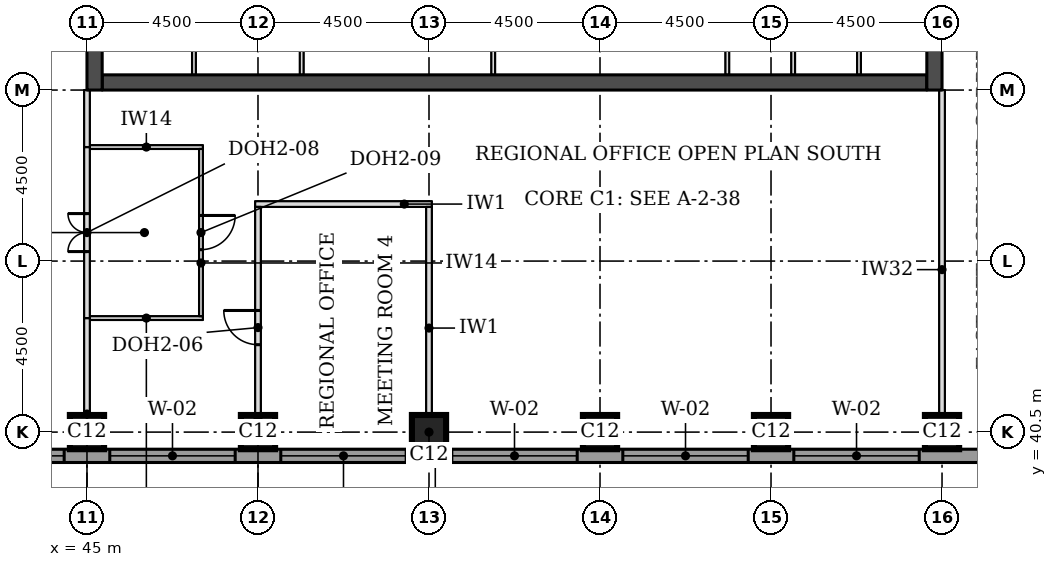
"""IFC4 building model, lengths in metres.
Left out: names, types, materials, properties, quantities, classifications, styles, units other than length and angle.
Written with IfcOpenShell. Run it as: python <this file> out.ifc"""

import sys

from ifc_helpers import new_model, si_unit, direction, frame, frame_2d, origin, origin_2d, place, context, subcontext, project, spatial, rectangle, extrude, element, fill, save


model = new_model("IFC4")
c1 = context("Model", 3, precision=1e-05, world=origin(), true_north=direction((0.0, 1.0)))
c2 = subcontext(c1, "Body", "Model", "MODEL_VIEW")
j1 = project(units=[si_unit("LENGTHUNIT", "METRE"), si_unit("PLANEANGLEUNIT", "RADIAN")], contexts=[c1])
p1 = place(None, origin())
s1 = spatial("IfcSite", under=j1, at=p1, CompositionType="ELEMENT")
p2 = place(p1, origin())
s2 = spatial("IfcBuilding", under=s1, at=p2, CompositionType="ELEMENT")
p3 = place(p2, frame((0.0, 0.0, 155.1)))
s3 = spatial("IfcBuildingStorey", under=s2, at=p3, CompositionType="ELEMENT", Elevation=155.1)
for number, where, z_axis, x_axis in (
    (1, (45.0, 40.5, 0.0), (0.0, 0.0, 1.0), (1.0, 0.0, 0.0)),
    (2, (49.5, 40.5, 0.0), (0.0, 0.0, 1.0), (1.0, 0.0, 0.0)),
    (3, (54.0, 40.5, 0.0), (0.0, 0.0, 1.0), (1.0, 0.0, 0.0)),
    (4, (58.5, 40.5, 0.0), (0.0, 0.0, 1.0), (1.0, 0.0, 0.0)),
    (5, (63.0, 40.5, 0.0), (0.0, 0.0, 1.0), (1.0, 0.0, 0.0)),
    (6, (67.5, 40.5, 0.0), (0.0, 0.0, 1.0), (1.0, 0.0, 0.0)),
):
    element("IfcColumn", number, at=place(p3, frame(where, z_axis=z_axis, x_axis=x_axis)), inside=s3, PredefinedType="COLUMN", context=c2, shape_type="SweptSolid", body=[
        extrude(rectangle(XDim=0.9, YDim=0.9, at=origin_2d()), origin(), (0.0, 0.0, 1.0), 3.7),
    ])
p4 = place(p3, frame((45.4, 49.7, 0.0), z_axis=(0.0, 0.0, 1.0), x_axis=(1.0, 0.0, 0.0)))
e7 = element("IfcWall", 7, at=p4, inside=s3, PredefinedType="SHEAR", context=c2, shape_type="SweptSolid", body=[
    extrude(rectangle(XDim=21.7, YDim=0.4, at=frame_2d((10.85, 0.0))), origin(), (0.0, 0.0, 1.0), 3.7),
])
p5 = place(p3, frame((45.2, 49.5, 0.0), z_axis=(0.0, 0.0, 1.0), x_axis=(0.0, 1.0, 0.0)))
e8 = element("IfcWall", 8, at=p5, inside=s3, PredefinedType="SHEAR", context=c2, shape_type="SweptSolid", body=[
    extrude(rectangle(XDim=22.5, YDim=0.4, at=frame_2d((11.25, 0.0))), origin(), (0.0, 0.0, 1.0), 3.7),
])
p6 = place(p5, frame((4.2, 0.0, 0.0)))
e9 = element("IfcOpeningElement", 9, at=p6, cuts=e8, PredefinedType="OPENING", context=c2, shape_type="SweptSolid", body=[
    extrude(rectangle(XDim=1.8, YDim=2.1, at=frame_2d((0.9, 1.05))), frame((0.0, 0.21, 0.0), z_axis=(0.0, -1.0, 0.0), x_axis=(1.0, 0.0, 0.0)), (0.0, 0.0, 1.0), 0.42),
])
p7 = place(p5, frame((6.9, 0.0, 0.0)))
e10 = element("IfcOpeningElement", 10, at=p7, cuts=e8, PredefinedType="OPENING", context=c2, shape_type="SweptSolid", body=[
    extrude(rectangle(XDim=1.1, YDim=2.1, at=frame_2d((0.55, 1.05))), frame((0.0, 0.21, 0.0), z_axis=(0.0, -1.0, 0.0), x_axis=(1.0, 0.0, 0.0)), (0.0, 0.0, 1.0), 0.42),
])
p8 = place(p5, frame((13.6, 0.0, 0.0)))
e11 = element("IfcOpeningElement", 11, at=p8, cuts=e8, PredefinedType="OPENING", context=c2, shape_type="SweptSolid", body=[
    extrude(rectangle(XDim=1.1, YDim=2.1, at=frame_2d((0.55, 1.05))), frame((0.0, 0.21, 0.0), z_axis=(0.0, -1.0, 0.0), x_axis=(1.0, 0.0, 0.0)), (0.0, 0.0, 1.0), 0.42),
])
p9 = place(p5, frame((16.5, 0.0, 0.0)))
e12 = element("IfcOpeningElement", 12, at=p9, cuts=e8, PredefinedType="OPENING", context=c2, shape_type="SweptSolid", body=[
    extrude(rectangle(XDim=1.8, YDim=2.1, at=frame_2d((0.9, 1.05))), frame((0.0, 0.21, 0.0), z_axis=(0.0, -1.0, 0.0), x_axis=(1.0, 0.0, 0.0)), (0.0, 0.0, 1.0), 0.42),
])
p10 = place(p3, frame((67.3, 49.5, 0.0), z_axis=(0.0, 0.0, 1.0), x_axis=(0.0, 1.0, 0.0)))
e13 = element("IfcWall", 13, at=p10, inside=s3, PredefinedType="SHEAR", context=c2, shape_type="SweptSolid", body=[
    extrude(rectangle(XDim=22.5, YDim=0.4, at=frame_2d((11.25, 0.0))), origin(), (0.0, 0.0, 1.0), 3.7),
])
p11 = place(p10, frame((4.2, 0.0, 0.0)))
e14 = element("IfcOpeningElement", 14, at=p11, cuts=e13, PredefinedType="OPENING", context=c2, shape_type="SweptSolid", body=[
    extrude(rectangle(XDim=1.8, YDim=2.1, at=frame_2d((0.9, 1.05))), frame((0.0, 0.21, 0.0), z_axis=(0.0, -1.0, 0.0), x_axis=(1.0, 0.0, 0.0)), (0.0, 0.0, 1.0), 0.42),
])
p12 = place(p10, frame((6.9, 0.0, 0.0)))
e15 = element("IfcOpeningElement", 15, at=p12, cuts=e13, PredefinedType="OPENING", context=c2, shape_type="SweptSolid", body=[
    extrude(rectangle(XDim=1.1, YDim=2.1, at=frame_2d((0.55, 1.05))), frame((0.0, 0.21, 0.0), z_axis=(0.0, -1.0, 0.0), x_axis=(1.0, 0.0, 0.0)), (0.0, 0.0, 1.0), 0.42),
])
p13 = place(p10, frame((13.6, 0.0, 0.0)))
e16 = element("IfcOpeningElement", 16, at=p13, cuts=e13, PredefinedType="OPENING", context=c2, shape_type="SweptSolid", body=[
    extrude(rectangle(XDim=1.1, YDim=2.1, at=frame_2d((0.55, 1.05))), frame((0.0, 0.21, 0.0), z_axis=(0.0, -1.0, 0.0), x_axis=(1.0, 0.0, 0.0)), (0.0, 0.0, 1.0), 0.42),
])
p14 = place(p10, frame((16.5, 0.0, 0.0)))
e17 = element("IfcOpeningElement", 17, at=p14, cuts=e13, PredefinedType="OPENING", context=c2, shape_type="SweptSolid", body=[
    extrude(rectangle(XDim=1.8, YDim=2.1, at=frame_2d((0.9, 1.05))), frame((0.0, 0.21, 0.0), z_axis=(0.0, -1.0, 0.0), x_axis=(1.0, 0.0, 0.0)), (0.0, 0.0, 1.0), 0.42),
])
p15 = place(p3, frame((36.0, 39.875, 0.0), z_axis=(0.0, 0.0, 1.0), x_axis=(1.0, 0.0, 0.0)))
e18 = element("IfcWall", 18, at=p15, inside=s3, PredefinedType="STANDARD", context=c2, shape_type="SweptSolid", body=[
    extrude(rectangle(XDim=36.331, YDim=0.35, at=frame_2d((18.166, 0.0))), origin(), (0.0, 0.0, 1.0), 3.525),
])
p16 = place(p15, frame((5.1, 0.0, 0.9)))
e19 = element("IfcOpeningElement", 19, at=p16, cuts=e18, PredefinedType="OPENING", context=c2, shape_type="SweptSolid", body=[
    extrude(rectangle(XDim=3.3, YDim=1.9, at=frame_2d((1.65, 0.95))), frame((0.0, 0.185, 0.0), z_axis=(0.0, -1.0, 0.0), x_axis=(1.0, 0.0, 0.0)), (0.0, 0.0, 1.0), 0.37),
])
p17 = place(p15, frame((9.6, 0.0, 0.9)))
e20 = element("IfcOpeningElement", 20, at=p17, cuts=e18, PredefinedType="OPENING", context=c2, shape_type="SweptSolid", body=[
    extrude(rectangle(XDim=3.3, YDim=1.9, at=frame_2d((1.65, 0.95))), frame((0.0, 0.185, 0.0), z_axis=(0.0, -1.0, 0.0), x_axis=(1.0, 0.0, 0.0)), (0.0, 0.0, 1.0), 0.37),
])
p18 = place(p15, frame((14.1, 0.0, 0.9)))
e21 = element("IfcOpeningElement", 21, at=p18, cuts=e18, PredefinedType="OPENING", context=c2, shape_type="SweptSolid", body=[
    extrude(rectangle(XDim=3.3, YDim=1.9, at=frame_2d((1.65, 0.95))), frame((0.0, 0.185, 0.0), z_axis=(0.0, -1.0, 0.0), x_axis=(1.0, 0.0, 0.0)), (0.0, 0.0, 1.0), 0.37),
])
p19 = place(p15, frame((18.6, 0.0, 0.9)))
e22 = element("IfcOpeningElement", 22, at=p19, cuts=e18, PredefinedType="OPENING", context=c2, shape_type="SweptSolid", body=[
    extrude(rectangle(XDim=3.3, YDim=1.9, at=frame_2d((1.65, 0.95))), frame((0.0, 0.185, 0.0), z_axis=(0.0, -1.0, 0.0), x_axis=(1.0, 0.0, 0.0)), (0.0, 0.0, 1.0), 0.37),
])
p20 = place(p15, frame((23.1, 0.0, 0.9)))
e23 = element("IfcOpeningElement", 23, at=p20, cuts=e18, PredefinedType="OPENING", context=c2, shape_type="SweptSolid", body=[
    extrude(rectangle(XDim=3.3, YDim=1.9, at=frame_2d((1.65, 0.95))), frame((0.0, 0.185, 0.0), z_axis=(0.0, -1.0, 0.0), x_axis=(1.0, 0.0, 0.0)), (0.0, 0.0, 1.0), 0.37),
])
p21 = place(p15, frame((27.6, 0.0, 0.9)))
e24 = element("IfcOpeningElement", 24, at=p21, cuts=e18, PredefinedType="OPENING", context=c2, shape_type="SweptSolid", body=[
    extrude(rectangle(XDim=3.3, YDim=1.9, at=frame_2d((1.65, 0.95))), frame((0.0, 0.185, 0.0), z_axis=(0.0, -1.0, 0.0), x_axis=(1.0, 0.0, 0.0)), (0.0, 0.0, 1.0), 0.37),
])
p22 = place(p3, frame((45.075, 43.5, 0.0), z_axis=(0.0, 0.0, 1.0), x_axis=(1.0, 0.0, 0.0)))
e25 = element("IfcWall", 25, at=p22, inside=s3, PredefinedType="PARTITIONING", context=c2, shape_type="SweptSolid", body=[
    extrude(rectangle(XDim=2.975, YDim=0.1, at=frame_2d((1.488, 0.0))), origin(), (0.0, 0.0, 1.0), 3.55),
])
p23 = place(p3, frame((49.425, 46.5, 0.0), z_axis=(0.0, 0.0, 1.0), x_axis=(1.0, 0.0, 0.0)))
e26 = element("IfcWall", 26, at=p23, inside=s3, PredefinedType="PARTITIONING", context=c2, shape_type="SweptSolid", body=[
    extrude(rectangle(XDim=4.65, YDim=0.15, at=frame_2d((2.325, 0.0))), origin(), (0.0, 0.0, 1.0), 3.55),
])
p24 = place(p3, frame((45.075, 48.0, 0.0), z_axis=(0.0, 0.0, 1.0), x_axis=(1.0, 0.0, 0.0)))
e27 = element("IfcWall", 27, at=p24, inside=s3, PredefinedType="PARTITIONING", context=c2, shape_type="SweptSolid", body=[
    extrude(rectangle(XDim=2.975, YDim=0.1, at=frame_2d((1.488, 0.0))), origin(), (0.0, 0.0, 1.0), 3.55),
])
p25 = place(p3, frame((45.0, 40.05, 0.0), z_axis=(0.0, 0.0, 1.0), x_axis=(0.0, 1.0, 0.0)))
e28 = element("IfcWall", 28, at=p25, inside=s3, PredefinedType="PARTITIONING", context=c2, shape_type="SweptSolid", body=[
    extrude(rectangle(XDim=3.45, YDim=0.15, at=frame_2d((1.725, 0.0))), origin(), (0.0, 0.0, 1.0), 3.022),
])
p26 = place(p3, frame((49.5, 40.05, 0.0), z_axis=(0.0, 0.0, 1.0), x_axis=(0.0, 1.0, 0.0)))
e29 = element("IfcWall", 29, at=p26, inside=s3, PredefinedType="PARTITIONING", context=c2, shape_type="SweptSolid", body=[
    extrude(rectangle(XDim=6.375, YDim=0.15, at=frame_2d((3.188, 0.0))), origin(), (0.0, 0.0, 1.0), 3.55),
])
p27 = place(p26, frame((2.75, 0.0, 0.0)))
e30 = element("IfcOpeningElement", 30, at=p27, cuts=e29, PredefinedType="OPENING", context=c2, shape_type="SweptSolid", body=[
    extrude(rectangle(XDim=0.9, YDim=2.1, at=frame_2d((0.45, 1.05))), frame((0.0, 0.085, 0.0), z_axis=(0.0, -1.0, 0.0), x_axis=(1.0, 0.0, 0.0)), (0.0, 0.0, 1.0), 0.17),
])
p28 = place(p3, frame((54.0, 40.05, 0.0), z_axis=(0.0, 0.0, 1.0), x_axis=(0.0, 1.0, 0.0)))
e31 = element("IfcWall", 31, at=p28, inside=s3, PredefinedType="PARTITIONING", context=c2, shape_type="SweptSolid", body=[
    extrude(rectangle(XDim=6.375, YDim=0.15, at=frame_2d((3.188, 0.0))), origin(), (0.0, 0.0, 1.0), 3.55),
])
p29 = place(p3, frame((67.5, 40.05, 0.0), z_axis=(0.0, 0.0, 1.0), x_axis=(0.0, 1.0, 0.0)))
e32 = element("IfcWall", 32, at=p29, inside=s3, PredefinedType="PARTITIONING", context=c2, shape_type="SweptSolid", body=[
    extrude(rectangle(XDim=9.45, YDim=0.15, at=frame_2d((4.725, 0.0))), origin(), (0.0, 0.0, 1.0), 3.022),
])
p30 = place(p3, frame((45.0, 43.5, 0.0), z_axis=(0.0, 0.0, 1.0), x_axis=(0.0, 1.0, 0.0)))
e33 = element("IfcWall", 33, at=p30, inside=s3, PredefinedType="PARTITIONING", context=c2, shape_type="SweptSolid", body=[
    extrude(rectangle(XDim=4.5, YDim=0.15, at=frame_2d((2.25, 0.0))), origin(), (0.0, 0.0, 1.0), 3.022),
])
p31 = place(p30, frame((1.75, 0.0, 0.0)))
e34 = element("IfcOpeningElement", 34, at=p31, cuts=e33, PredefinedType="OPENING", context=c2, shape_type="SweptSolid", body=[
    extrude(rectangle(XDim=1.0, YDim=2.1, at=frame_2d((0.5, 1.05))), frame((0.0, 0.085, 0.0), z_axis=(0.0, -1.0, 0.0), x_axis=(1.0, 0.0, 0.0)), (0.0, 0.0, 1.0), 0.17),
])
p32 = place(p3, frame((48.0, 43.55, 0.0), z_axis=(0.0, 0.0, 1.0), x_axis=(0.0, 1.0, 0.0)))
e35 = element("IfcWall", 35, at=p32, inside=s3, PredefinedType="PARTITIONING", context=c2, shape_type="SweptSolid", body=[
    extrude(rectangle(XDim=4.4, YDim=0.1, at=frame_2d((2.2, 0.0))), origin(), (0.0, 0.0, 1.0), 3.55),
])
p33 = place(p32, frame((1.75, 0.0, 0.0)))
e36 = element("IfcOpeningElement", 36, at=p33, cuts=e35, PredefinedType="OPENING", context=c2, shape_type="SweptSolid", body=[
    extrude(rectangle(XDim=0.9, YDim=2.1, at=frame_2d((0.45, 1.05))), frame((0.0, 0.06, 0.0), z_axis=(0.0, -1.0, 0.0), x_axis=(1.0, 0.0, 0.0)), (0.0, 0.0, 1.0), 0.12),
])
p34 = place(p3, frame((45.0, 48.0, 0.0), z_axis=(0.0, 0.0, 1.0), x_axis=(0.0, 1.0, 0.0)))
e37 = element("IfcWall", 37, at=p34, inside=s3, PredefinedType="PARTITIONING", context=c2, shape_type="SweptSolid", body=[
    extrude(rectangle(XDim=1.5, YDim=0.15, at=frame_2d((0.75, 0.0))), origin(), (0.0, 0.0, 1.0), 3.022),
])
for number, where, z_axis, x_axis in (
    (38, (47.815, 49.9, 0.0), (0.0, 0.0, 1.0), (0.0, 1.0, 0.0)),
    (39, (50.65, 49.9, 0.0), (0.0, 0.0, 1.0), (0.0, 1.0, 0.0)),
    (40, (55.69, 49.9, 0.0), (0.0, 0.0, 1.0), (0.0, 1.0, 0.0)),
    (41, (61.85, 49.9, 0.0), (0.0, 0.0, 1.0), (0.0, 1.0, 0.0)),
    (42, (63.583, 49.9, 0.0), (0.0, 0.0, 1.0), (0.0, 1.0, 0.0)),
    (43, (65.315, 49.9, 0.0), (0.0, 0.0, 1.0), (0.0, 1.0, 0.0)),
):
    element("IfcWall", number, at=place(p3, frame(where, z_axis=z_axis, x_axis=x_axis)), inside=s3, PredefinedType="PARTITIONING", context=c2, shape_type="SweptSolid", body=[
        extrude(rectangle(XDim=3.1, YDim=0.1, at=frame_2d((1.55, 0.0))), origin(), (0.0, 0.0, 1.0), 3.55),
    ])
p35 = place(p16, origin())
e44 = element("IfcWindow", 44, at=p35, inside=s3, PartitioningType="SINGLE_PANEL", PredefinedType="WINDOW", context=c2, shape_type="SweptSolid", body=[
    extrude(rectangle(XDim=3.3, YDim=1.9, at=frame_2d((1.65, 0.95))), frame((0.0, 0.085, 0.0), z_axis=(0.0, -1.0, 0.0), x_axis=(1.0, 0.0, 0.0)), (0.0, 0.0, 1.0), 0.06),
])
fill(e19, e44)
p36 = place(p17, origin())
e45 = element("IfcWindow", 45, at=p36, inside=s3, PartitioningType="SINGLE_PANEL", PredefinedType="WINDOW", context=c2, shape_type="SweptSolid", body=[
    extrude(rectangle(XDim=3.3, YDim=1.9, at=frame_2d((1.65, 0.95))), frame((0.0, 0.085, 0.0), z_axis=(0.0, -1.0, 0.0), x_axis=(1.0, 0.0, 0.0)), (0.0, 0.0, 1.0), 0.06),
])
fill(e20, e45)
p37 = place(p18, origin())
e46 = element("IfcWindow", 46, at=p37, inside=s3, PartitioningType="SINGLE_PANEL", PredefinedType="WINDOW", context=c2, shape_type="SweptSolid", body=[
    extrude(rectangle(XDim=3.3, YDim=1.9, at=frame_2d((1.65, 0.95))), frame((0.0, 0.085, 0.0), z_axis=(0.0, -1.0, 0.0), x_axis=(1.0, 0.0, 0.0)), (0.0, 0.0, 1.0), 0.06),
])
fill(e21, e46)
p38 = place(p19, origin())
e47 = element("IfcWindow", 47, at=p38, inside=s3, PartitioningType="SINGLE_PANEL", PredefinedType="WINDOW", context=c2, shape_type="SweptSolid", body=[
    extrude(rectangle(XDim=3.3, YDim=1.9, at=frame_2d((1.65, 0.95))), frame((0.0, 0.085, 0.0), z_axis=(0.0, -1.0, 0.0), x_axis=(1.0, 0.0, 0.0)), (0.0, 0.0, 1.0), 0.06),
])
fill(e22, e47)
p39 = place(p20, origin())
e48 = element("IfcWindow", 48, at=p39, inside=s3, PartitioningType="SINGLE_PANEL", PredefinedType="WINDOW", context=c2, shape_type="SweptSolid", body=[
    extrude(rectangle(XDim=3.3, YDim=1.9, at=frame_2d((1.65, 0.95))), frame((0.0, 0.085, 0.0), z_axis=(0.0, -1.0, 0.0), x_axis=(1.0, 0.0, 0.0)), (0.0, 0.0, 1.0), 0.06),
])
fill(e23, e48)
p40 = place(p21, origin())
e49 = element("IfcWindow", 49, at=p40, inside=s3, PartitioningType="SINGLE_PANEL", PredefinedType="WINDOW", context=c2, shape_type="SweptSolid", body=[
    extrude(rectangle(XDim=3.3, YDim=1.9, at=frame_2d((1.65, 0.95))), frame((0.0, 0.085, 0.0), z_axis=(0.0, -1.0, 0.0), x_axis=(1.0, 0.0, 0.0)), (0.0, 0.0, 1.0), 0.06),
])
fill(e24, e49)
p41 = place(p31, origin())
e50 = element("IfcDoor", 50, at=p41, inside=s3, OperationType="DOUBLE_DOOR_SINGLE_SWING", PredefinedType="DOOR", context=c2, shape_type="SweptSolid", body=[
    extrude(rectangle(XDim=1.0, YDim=2.1, at=frame_2d((0.5, 1.05))), frame((0.0, 0.025, 0.0), z_axis=(0.0, -1.0, 0.0), x_axis=(1.0, 0.0, 0.0)), (0.0, 0.0, 1.0), 0.05),
])
fill(e34, e50)
p42 = place(p33, frame((0.9, 0.0, 0.0), z_axis=(0.0, 0.0, 1.0), x_axis=(-1.0, 0.0, 0.0)))
e51 = element("IfcDoor", 51, at=p42, inside=s3, OperationType="SINGLE_SWING_LEFT", PredefinedType="DOOR", context=c2, shape_type="SweptSolid", body=[
    extrude(rectangle(XDim=0.9, YDim=2.1, at=frame_2d((0.45, 1.05))), frame((0.0, 0.025, 0.0), z_axis=(0.0, -1.0, 0.0), x_axis=(1.0, 0.0, 0.0)), (0.0, 0.0, 1.0), 0.05),
])
fill(e36, e51)
p43 = place(p27, origin())
e52 = element("IfcDoor", 52, at=p43, inside=s3, OperationType="SINGLE_SWING_RIGHT", PredefinedType="DOOR", context=c2, shape_type="SweptSolid", body=[
    extrude(rectangle(XDim=0.9, YDim=2.1, at=frame_2d((0.45, 1.05))), frame((0.0, 0.025, 0.0), z_axis=(0.0, -1.0, 0.0), x_axis=(1.0, 0.0, 0.0)), (0.0, 0.0, 1.0), 0.05),
])
fill(e30, e52)
save(model, sys.argv[1])
